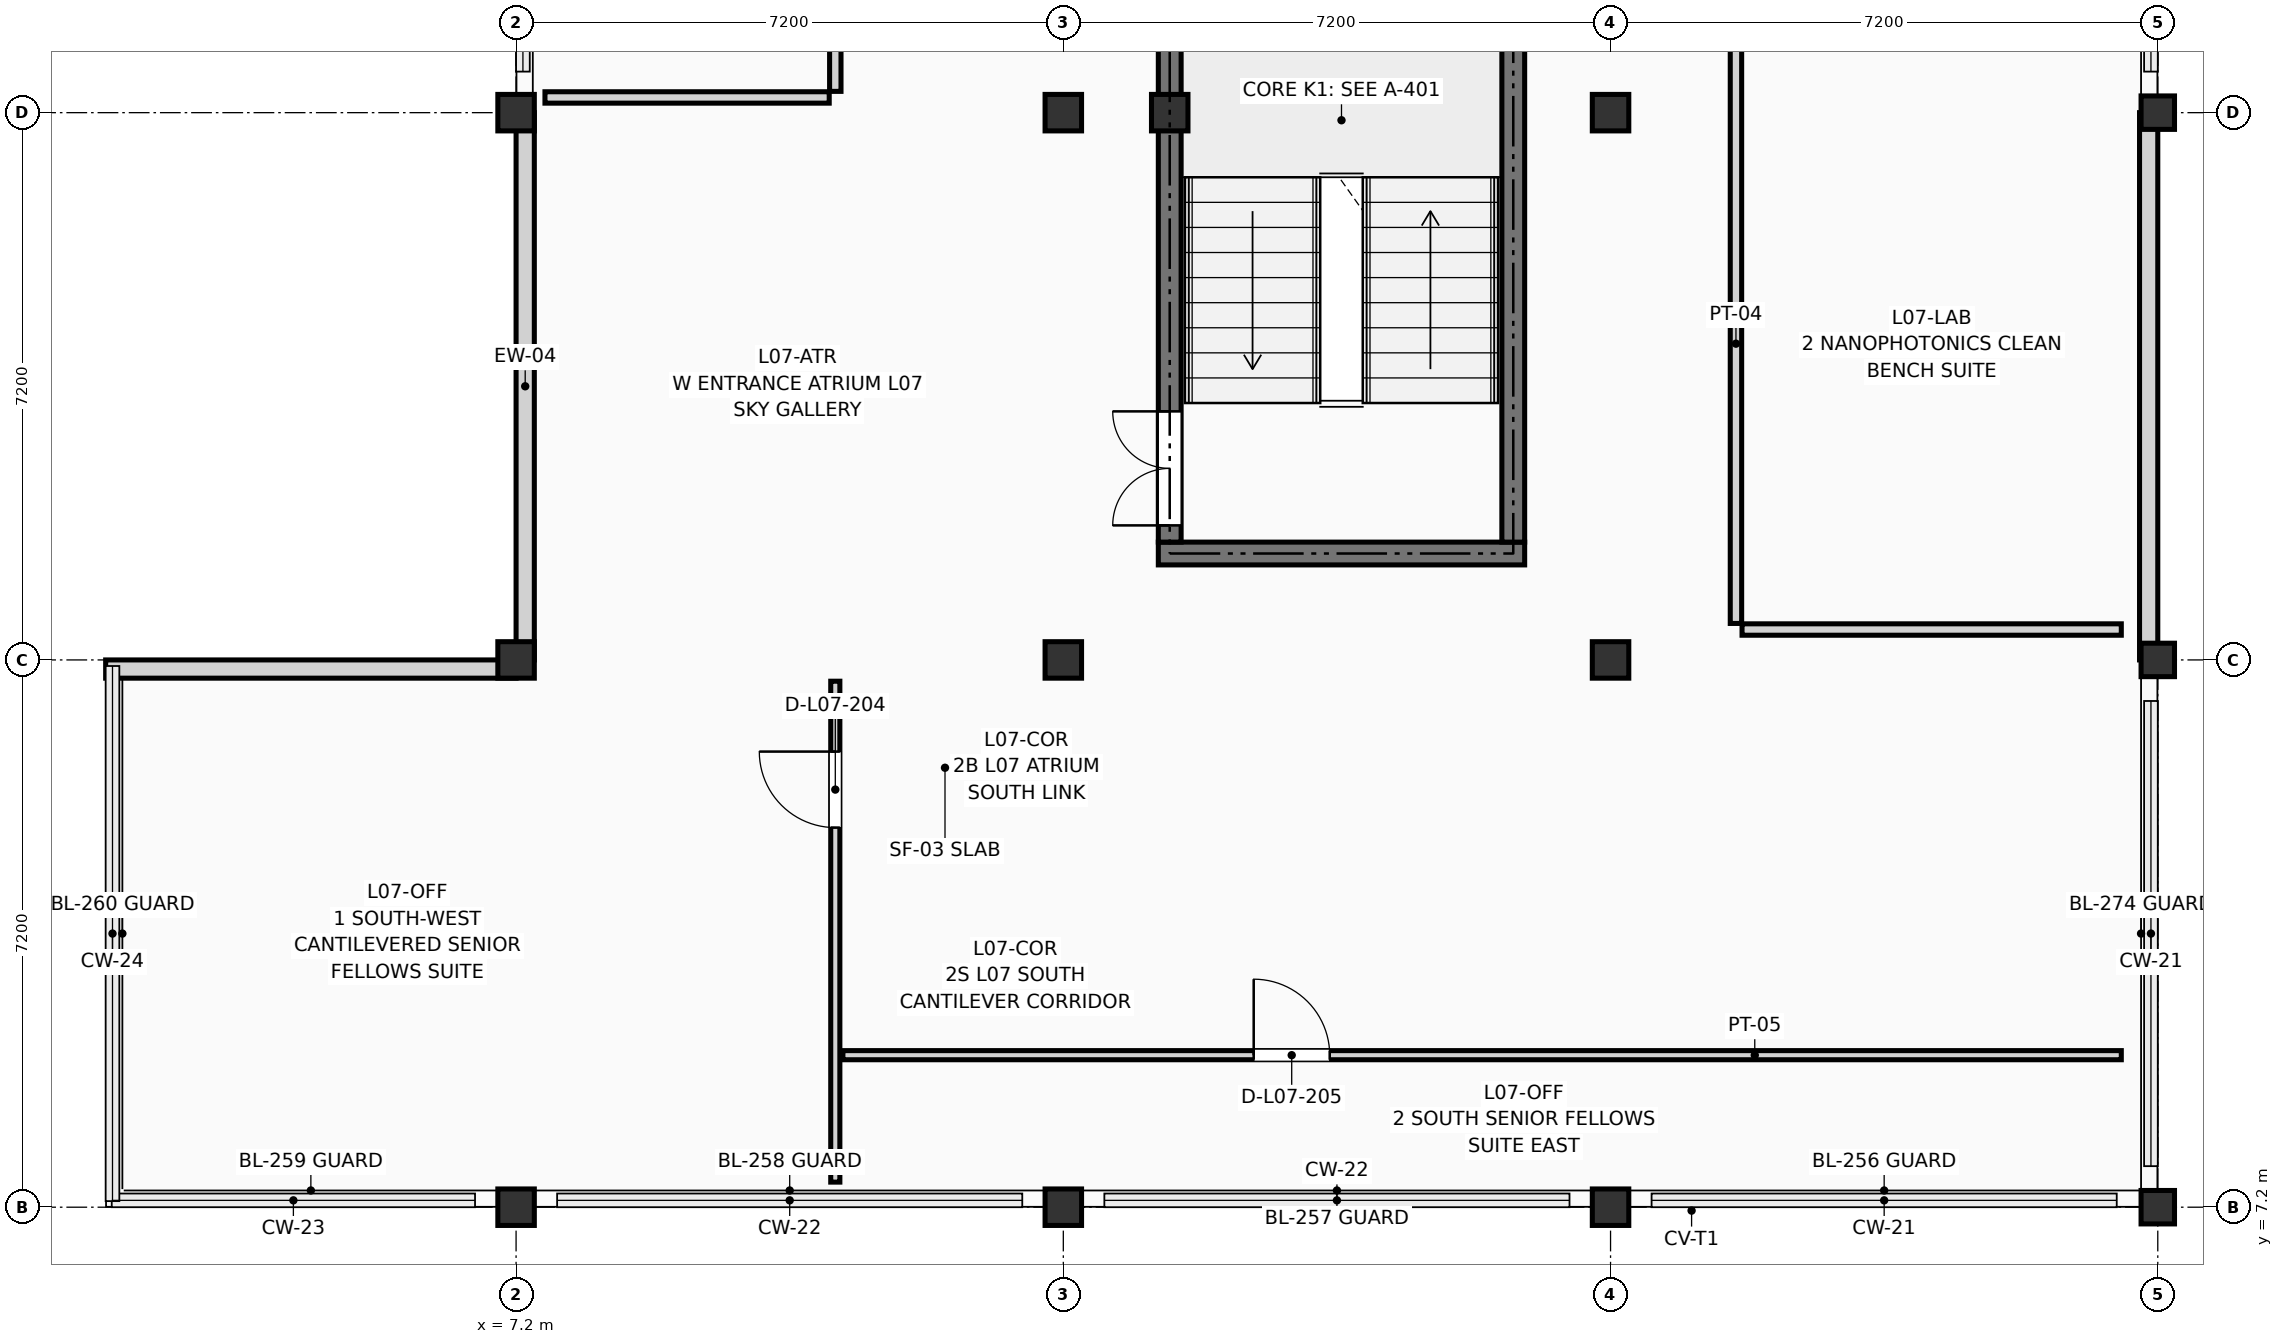
"""IFC4 building model, lengths in metres.
Left out: names, types, materials, properties, quantities, classifications, styles, units other than length and angle.
Written with IfcOpenShell. Run it as: python <this file> out.ifc"""

import sys

from ifc_helpers import new_model, si_unit, direction, frame, frame_2d, origin, origin_2d, place, context, subcontext, project, spatial, rectangle, extrude, element, fill, save


model = new_model("IFC4")
c1 = context("Model", 3, precision=1e-05, world=origin(), true_north=direction((0.0, 1.0)))
c2 = subcontext(c1, "Body", "Model", "MODEL_VIEW")
j1 = project(units=[si_unit("LENGTHUNIT", "METRE"), si_unit("PLANEANGLEUNIT", "RADIAN")], contexts=[c1])
p1 = place(None, origin())
s1 = spatial("IfcSite", under=j1, at=p1, CompositionType="ELEMENT")
p2 = place(p1, origin())
s2 = spatial("IfcBuilding", under=s1, at=p2, CompositionType="ELEMENT")
p3 = place(p2, frame((0.0, 0.0, 26.25)))
s3 = spatial("IfcBuildingStorey", under=s2, at=p3, CompositionType="ELEMENT", Elevation=26.25)
for number, where, z_axis, x_axis in (
    (1, (7.2, 7.2, 0.0), (0.0, 0.0, 1.0), (1.0, 0.0, 0.0)),
    (2, (7.2, 14.4, 0.0), (0.0, 0.0, 1.0), (1.0, 0.0, 0.0)),
    (3, (7.2, 21.6, 0.0), (0.0, 0.0, 1.0), (1.0, 0.0, 0.0)),
    (4, (14.4, 7.2, 0.0), (0.0, 0.0, 1.0), (1.0, 0.0, 0.0)),
    (5, (14.4, 14.4, 0.0), (0.0, 0.0, 1.0), (1.0, 0.0, 0.0)),
    (6, (14.4, 21.6, 0.0), (0.0, 0.0, 1.0), (1.0, 0.0, 0.0)),
    (7, (15.8, 21.6, 0.0), (0.0, 0.0, 1.0), (1.0, 0.0, 0.0)),
    (8, (21.6, 7.2, 0.0), (0.0, 0.0, 1.0), (1.0, 0.0, 0.0)),
    (9, (21.6, 14.4, 0.0), (0.0, 0.0, 1.0), (1.0, 0.0, 0.0)),
    (10, (21.6, 21.6, 0.0), (0.0, 0.0, 1.0), (1.0, 0.0, 0.0)),
):
    element("IfcColumn", number, at=place(p3, frame(where, z_axis=z_axis, x_axis=x_axis)), inside=s3, PredefinedType="COLUMN", context=c2, shape_type="SweptSolid", body=[
        extrude(rectangle(XDim=0.48, YDim=0.48, at=origin_2d()), origin(), (0.0, 0.0, 1.0), 3.45),
    ])
for number, where, z_axis, x_axis in (
    (11, (28.8, 7.2, 0.0), (0.0, 0.0, 1.0), (1.0, 0.0, 0.0)),
    (12, (28.8, 14.4, 0.0), (0.0, 0.0, 1.0), (1.0, 0.0, 0.0)),
    (13, (28.8, 21.6, 0.0), (0.0, 0.0, 1.0), (1.0, 0.0, 0.0)),
):
    element("IfcColumn", number, at=place(p3, frame(where, z_axis=z_axis, x_axis=x_axis)), inside=s3, PredefinedType="COLUMN", context=c2, shape_type="SweptSolid", body=[
        extrude(rectangle(XDim=0.44, YDim=0.44, at=origin_2d()), origin(), (0.0, 0.0, 1.0), 3.45),
    ])
p4 = place(p3, frame((1.8, 14.28, 0.0), z_axis=(0.0, 0.0, 1.0), x_axis=(1.0, 0.0, 0.0)))
e14 = element("IfcWall", 14, at=p4, inside=s3, PredefinedType="SOLIDWALL", context=c2, shape_type="SweptSolid", body=[
    extrude(rectangle(XDim=5.4, YDim=0.24, at=frame_2d((2.7, 0.0))), origin(), (0.0, 0.0, 1.0), 2.546),
])
for number, where, z_axis, x_axis in (
    (15, (7.32, 14.4, 0.0), (0.0, 0.0, 1.0), (0.0, 1.0, 0.0)),
    (16, (28.68, 14.4, 0.0), (0.0, 0.0, 1.0), (0.0, 1.0, 0.0)),
):
    element("IfcWall", number, at=place(p3, frame(where, z_axis=z_axis, x_axis=x_axis)), inside=s3, PredefinedType="SOLIDWALL", context=c2, shape_type="SweptSolid", body=[
        extrude(rectangle(XDim=7.2, YDim=0.24, at=frame_2d((3.6, 0.0))), origin(), (0.0, 0.0, 1.0), 2.69),
    ])
p5 = place(p3, frame((15.65, 15.8, 0.0), z_axis=(0.0, 0.0, 1.0), x_axis=(1.0, 0.0, 0.0)))
e17 = element("IfcWall", 17, at=p5, inside=s3, PredefinedType="SHEAR", context=c2, shape_type="SweptSolid", body=[
    extrude(rectangle(XDim=4.82, YDim=0.3, at=frame_2d((2.41, 0.0))), origin(), (0.0, 0.0, 1.0), 3.24),
])
p6 = place(p3, frame((15.8, 15.95, 0.0), z_axis=(0.0, 0.0, 1.0), x_axis=(0.0, 1.0, 0.0)))
e18 = element("IfcWall", 18, at=p6, inside=s3, PredefinedType="SHEAR", context=c2, shape_type="SweptSolid", body=[
    extrude(rectangle(XDim=7.7, YDim=0.3, at=frame_2d((3.85, 0.0))), origin(), (0.0, 0.0, 1.0), 3.24),
])
p7 = place(p6, frame((0.22, 0.0, 0.0)))
e19 = element("IfcOpeningElement", 19, at=p7, cuts=e18, PredefinedType="OPENING", context=c2, shape_type="SweptSolid", body=[
    extrude(rectangle(XDim=1.5, YDim=2.2, at=frame_2d((0.75, 1.1))), frame((0.0, 0.162, 0.0), z_axis=(0.0, -1.0, 0.0), x_axis=(1.0, 0.0, 0.0)), (0.0, 0.0, 1.0), 0.324),
])
p8 = place(p3, frame((20.32, 15.95, 0.0), z_axis=(0.0, 0.0, 1.0), x_axis=(0.0, 1.0, 0.0)))
e20 = element("IfcWall", 20, at=p8, inside=s3, PredefinedType="SHEAR", context=c2, shape_type="SweptSolid", body=[
    extrude(rectangle(XDim=7.7, YDim=0.3, at=frame_2d((3.85, 0.0))), origin(), (0.0, 0.0, 1.0), 3.24),
])
p9 = place(p3, frame((11.4, 7.53, 0.0), z_axis=(0.0, 0.0, 1.0), x_axis=(0.0, 1.0, 0.0)))
e21 = element("IfcWall", 21, at=p9, inside=s3, PredefinedType="PARTITIONING", context=c2, shape_type="SweptSolid", body=[
    extrude(rectangle(XDim=6.59, YDim=0.12, at=frame_2d((3.295, 0.0))), origin(), (0.0, 0.0, 1.0), 3.225),
])
p10 = place(p9, frame((4.664, 0.0, 0.0)))
e22 = element("IfcOpeningElement", 22, at=p10, cuts=e21, PredefinedType="OPENING", context=c2, shape_type="SweptSolid", body=[
    extrude(rectangle(XDim=1.0, YDim=2.15, at=frame_2d((0.5, 1.075))), frame((0.0, 0.072, 0.0), z_axis=(0.0, -1.0, 0.0), x_axis=(1.0, 0.0, 0.0)), (0.0, 0.0, 1.0), 0.144),
])
p11 = place(p3, frame((11.5, 9.2, 0.0), z_axis=(0.0, 0.0, 1.0), x_axis=(1.0, 0.0, 0.0)))
e23 = element("IfcWall", 23, at=p11, inside=s3, PredefinedType="PARTITIONING", context=c2, shape_type="SweptSolid", body=[
    extrude(rectangle(XDim=16.82, YDim=0.12, at=frame_2d((8.41, 0.0))), origin(), (0.0, 0.0, 1.0), 3.225),
])
p12 = place(p11, frame((5.405, 0.0, 0.0)))
e24 = element("IfcOpeningElement", 24, at=p12, cuts=e23, PredefinedType="OPENING", context=c2, shape_type="SweptSolid", body=[
    extrude(rectangle(XDim=1.0, YDim=2.15, at=frame_2d((0.5, 1.075))), frame((0.0, 0.072, 0.0), z_axis=(0.0, -1.0, 0.0), x_axis=(1.0, 0.0, 0.0)), (0.0, 0.0, 1.0), 0.144),
])
p13 = place(p3, frame((7.58, 21.8, 0.0), z_axis=(0.0, 0.0, 1.0), x_axis=(1.0, 0.0, 0.0)))
e25 = element("IfcWall", 25, at=p13, inside=s3, PredefinedType="PARTITIONING", context=c2, shape_type="SweptSolid", body=[
    extrude(rectangle(XDim=3.74, YDim=0.15, at=frame_2d((1.87, 0.0))), origin(), (0.0, 0.0, 1.0), 2.541),
])
p14 = place(p3, frame((11.4, 21.88, 0.0), z_axis=(0.0, 0.0, 1.0), x_axis=(0.0, 1.0, 0.0)))
e26 = element("IfcWall", 26, at=p14, inside=s3, PredefinedType="PARTITIONING", context=c2, shape_type="SweptSolid", body=[
    extrude(rectangle(XDim=11.44, YDim=0.15, at=frame_2d((5.72, 0.0))), origin(), (0.0, 0.0, 1.0), 3.225),
])
p15 = place(p14, frame((5.045, 0.0, 0.0)))
e27 = element("IfcOpeningElement", 27, at=p15, cuts=e26, PredefinedType="OPENING", context=c2, shape_type="SweptSolid", body=[
    extrude(rectangle(XDim=1.35, YDim=2.2, at=frame_2d((0.675, 1.1))), frame((0.0, 0.087, 0.0), z_axis=(0.0, -1.0, 0.0), x_axis=(1.0, 0.0, 0.0)), (0.0, 0.0, 1.0), 0.174),
])
p16 = place(p3, frame((23.25, 14.88, 0.0), z_axis=(0.0, 0.0, 1.0), x_axis=(0.0, 1.0, 0.0)))
e28 = element("IfcWall", 28, at=p16, inside=s3, PredefinedType="PARTITIONING", context=c2, shape_type="SweptSolid", body=[
    extrude(rectangle(XDim=14.04, YDim=0.15, at=frame_2d((7.02, 0.0))), origin(), (0.0, 0.0, 1.0), 3.225),
])
p17 = place(p16, frame((8.132, 0.0, 0.0)))
e29 = element("IfcOpeningElement", 29, at=p17, cuts=e28, PredefinedType="OPENING", context=c2, shape_type="SweptSolid", body=[
    extrude(rectangle(XDim=1.35, YDim=2.2, at=frame_2d((0.675, 1.1))), frame((0.0, 0.087, 0.0), z_axis=(0.0, -1.0, 0.0), x_axis=(1.0, 0.0, 0.0)), (0.0, 0.0, 1.0), 0.174),
])
p18 = place(p3, frame((23.33, 14.8, 0.0), z_axis=(0.0, 0.0, 1.0), x_axis=(1.0, 0.0, 0.0)))
e30 = element("IfcWall", 30, at=p18, inside=s3, PredefinedType="PARTITIONING", context=c2, shape_type="SweptSolid", body=[
    extrude(rectangle(XDim=4.99, YDim=0.15, at=frame_2d((2.495, 0.0))), origin(), (0.0, 0.0, 1.0), 3.225),
])
p19 = place(p7, origin())
e31 = element("IfcDoor", 31, at=p19, inside=s3, OperationType="DOUBLE_DOOR_SINGLE_SWING", PredefinedType="DOOR", context=c2, shape_type="SweptSolid", body=[
    extrude(rectangle(XDim=1.5, YDim=2.2, at=frame_2d((0.75, 1.1))), frame((0.0, 0.025, 0.0), z_axis=(0.0, -1.0, 0.0), x_axis=(1.0, 0.0, 0.0)), (0.0, 0.0, 1.0), 0.05),
])
fill(e19, e31)
p20 = place(p10, origin())
e32 = element("IfcDoor", 32, at=p20, inside=s3, OperationType="SINGLE_SWING_RIGHT", PredefinedType="DOOR", context=c2, shape_type="SweptSolid", body=[
    extrude(rectangle(XDim=1.0, YDim=2.15, at=frame_2d((0.5, 1.075))), frame((0.0, 0.025, 0.0), z_axis=(0.0, -1.0, 0.0), x_axis=(1.0, 0.0, 0.0)), (0.0, 0.0, 1.0), 0.05),
])
fill(e22, e32)
p21 = place(p12, origin())
e33 = element("IfcDoor", 33, at=p21, inside=s3, OperationType="SINGLE_SWING_LEFT", PredefinedType="DOOR", context=c2, shape_type="SweptSolid", body=[
    extrude(rectangle(XDim=1.0, YDim=2.15, at=frame_2d((0.5, 1.075))), frame((0.0, 0.025, 0.0), z_axis=(0.0, -1.0, 0.0), x_axis=(1.0, 0.0, 0.0)), (0.0, 0.0, 1.0), 0.05),
])
fill(e24, e33)
save(model, sys.argv[1])
